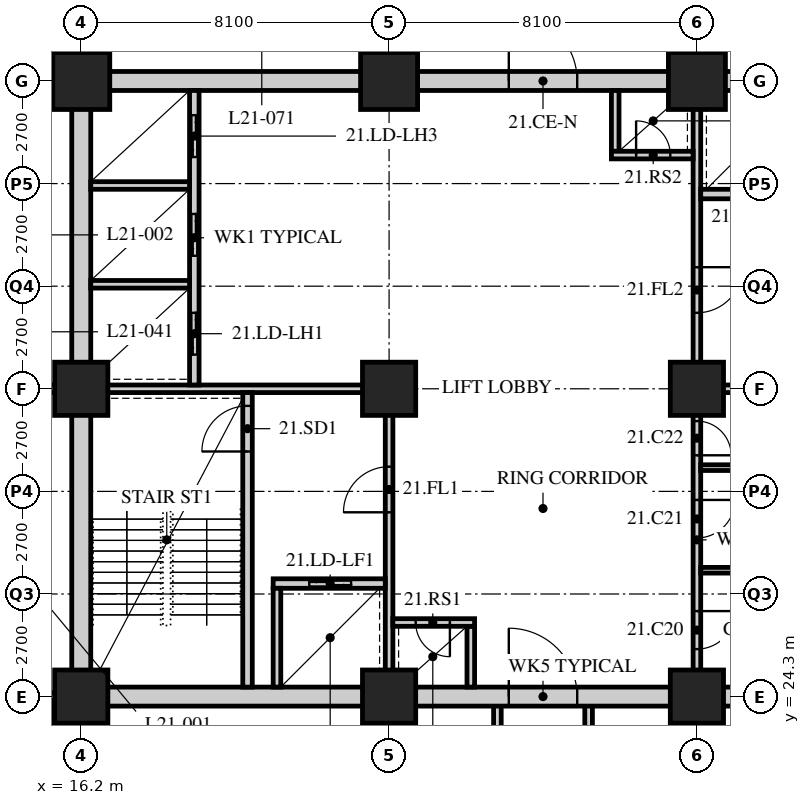
"""IFC4 building model, lengths in metres.
Left out: names, types, materials, properties, quantities, classifications, styles, units other than length and angle.
Written with IfcOpenShell. Run it as: python <this file> out.ifc"""

import sys

from ifc_helpers import new_model, si_unit, direction, frame, frame_2d, origin, origin_2d, place, context, subcontext, project, spatial, rectangle, hollow_rectangle, extrude, element, fill, save


model = new_model("IFC4")
c1 = context("Model", 3, precision=1e-05, world=origin(), true_north=direction((0.0, 1.0)))
c2 = subcontext(c1, "Body", "Model", "MODEL_VIEW")
j1 = project(units=[si_unit("LENGTHUNIT", "METRE"), si_unit("PLANEANGLEUNIT", "RADIAN")], contexts=[c1])
p1 = place(None, origin())
s1 = spatial("IfcSite", under=j1, at=p1, CompositionType="ELEMENT")
p2 = place(p1, origin())
s2 = spatial("IfcBuilding", under=s1, at=p2, CompositionType="ELEMENT")
p3 = place(p2, frame((0.0, 0.0, 84.0)))
s3 = spatial("IfcBuildingStorey", under=s2, at=p3, CompositionType="ELEMENT", Elevation=84.0)
for number, where, z_axis, x_axis in (
    (1, (16.2, 24.3, 0.0), (0.0, 0.0, 1.0), (1.0, 0.0, 0.0)),
    (2, (16.2, 32.4, 0.0), (0.0, 0.0, 1.0), (1.0, 0.0, 0.0)),
):
    element("IfcColumn", number, at=place(p3, frame(where, z_axis=z_axis, x_axis=x_axis)), inside=s3, PredefinedType="COLUMN", context=c2, shape_type="SweptSolid", body=[
        extrude(hollow_rectangle(XDim=1.4, YDim=1.4, WallThickness=0.12, at=origin_2d()), origin(), (0.0, 0.0, 1.0), 3.4),
    ])
p4 = place(p3, frame((16.2, 40.5, 0.0), z_axis=(0.0, 0.0, 1.0), x_axis=(1.0, 0.0, 0.0)))
e3 = element("IfcColumn", 3, at=p4, inside=s3, PredefinedType="COLUMN", context=c2, shape_type="SweptSolid", body=[
    extrude(hollow_rectangle(XDim=1.5, YDim=1.5, WallThickness=0.13, at=origin_2d()), origin(), (0.0, 0.0, 1.0), 3.4),
])
for number, where, z_axis, x_axis in (
    (4, (24.3, 24.3, 0.0), (0.0, 0.0, 1.0), (1.0, 0.0, 0.0)),
    (5, (24.3, 32.4, 0.0), (0.0, 0.0, 1.0), (1.0, 0.0, 0.0)),
):
    element("IfcColumn", number, at=place(p3, frame(where, z_axis=z_axis, x_axis=x_axis)), inside=s3, PredefinedType="COLUMN", context=c2, shape_type="SweptSolid", body=[
        extrude(hollow_rectangle(XDim=1.4, YDim=1.4, WallThickness=0.12, at=origin_2d()), origin(), (0.0, 0.0, 1.0), 3.4),
    ])
p5 = place(p3, frame((24.3, 40.5, 0.0), z_axis=(0.0, 0.0, 1.0), x_axis=(1.0, 0.0, 0.0)))
e6 = element("IfcColumn", 6, at=p5, inside=s3, PredefinedType="COLUMN", context=c2, shape_type="SweptSolid", body=[
    extrude(hollow_rectangle(XDim=1.5, YDim=1.5, WallThickness=0.13, at=origin_2d()), origin(), (0.0, 0.0, 1.0), 3.4),
])
for number, where, z_axis, x_axis in (
    (7, (32.4, 24.3, 0.0), (0.0, 0.0, 1.0), (1.0, 0.0, 0.0)),
    (8, (32.4, 32.4, 0.0), (0.0, 0.0, 1.0), (1.0, 0.0, 0.0)),
):
    element("IfcColumn", number, at=place(p3, frame(where, z_axis=z_axis, x_axis=x_axis)), inside=s3, PredefinedType="COLUMN", context=c2, shape_type="SweptSolid", body=[
        extrude(hollow_rectangle(XDim=1.4, YDim=1.4, WallThickness=0.12, at=origin_2d()), origin(), (0.0, 0.0, 1.0), 3.4),
    ])
p6 = place(p3, frame((32.4, 40.5, 0.0), z_axis=(0.0, 0.0, 1.0), x_axis=(1.0, 0.0, 0.0)))
e9 = element("IfcColumn", 9, at=p6, inside=s3, PredefinedType="COLUMN", context=c2, shape_type="SweptSolid", body=[
    extrude(hollow_rectangle(XDim=1.5, YDim=1.5, WallThickness=0.13, at=origin_2d()), origin(), (0.0, 0.0, 1.0), 3.4),
])
p7 = place(p3, frame((16.0, 40.5, 0.0), z_axis=(0.0, 0.0, 1.0), x_axis=(-1.0, 0.0, 0.0)))
e10 = element("IfcWall", 10, at=p7, inside=s3, PredefinedType="PARTITIONING", context=c2, shape_type="SweptSolid", body=[
    extrude(rectangle(XDim=2.05, YDim=0.15, at=frame_2d((1.025, 0.0))), origin(), (0.0, 0.0, 1.0), 2.428),
])
p8 = place(p3, frame((13.95, 32.4, 0.0), z_axis=(0.0, 0.0, 1.0), x_axis=(1.0, 0.0, 0.0)))
e11 = element("IfcWall", 11, at=p8, inside=s3, PredefinedType="SOLIDWALL", context=c2, shape_type="SweptSolid", body=[
    extrude(rectangle(XDim=2.25, YDim=0.2, at=frame_2d((1.125, 0.0))), origin(), (0.0, 0.0, 1.0), 2.428),
])
p9 = place(p3, frame((15.55, 18.0, 0.0), z_axis=(0.0, 0.0, 1.0), x_axis=(0.0, 1.0, 0.0)))
e12 = element("IfcWall", 12, at=p9, inside=s3, PredefinedType="SOLIDWALL", context=c2, shape_type="SweptSolid", body=[
    extrude(rectangle(XDim=6.3, YDim=0.2, at=frame_2d((3.15, 0.0))), origin(), (0.0, 0.0, 1.0), 3.19),
])
p10 = place(p3, frame((32.407, 18.0, 0.0), z_axis=(0.0, 0.0, 1.0), x_axis=(0.0, 1.0, 0.0)))
e13 = element("IfcWall", 13, at=p10, inside=s3, PredefinedType="SOLIDWALL", context=c2, shape_type="SweptSolid", body=[
    extrude(rectangle(XDim=6.3, YDim=0.2, at=frame_2d((3.15, 0.0))), origin(), (0.0, 0.0, 1.0), 2.428),
])
for number, where, z_axis, x_axis in (
    (14, (27.15, 18.0, 0.0), (0.0, 0.0, 1.0), (0.0, 1.0, 0.0)),
    (15, (29.55, 18.0, 0.0), (0.0, 0.0, 1.0), (0.0, 1.0, 0.0)),
):
    element("IfcWall", number, at=place(p3, frame(where, z_axis=z_axis, x_axis=x_axis)), inside=s3, PredefinedType="SOLIDWALL", context=c2, shape_type="SweptSolid", body=[
        extrude(rectangle(XDim=6.3, YDim=0.2, at=frame_2d((3.15, 0.0))), origin(), (0.0, 0.0, 1.0), 3.19),
    ])
p11 = place(p3, frame((13.95, 24.3, 0.0), z_axis=(0.0, 0.0, 1.0), x_axis=(1.0, 0.0, 0.0)))
e16 = element("IfcWall", 16, at=p11, inside=s3, PredefinedType="SOLIDWALL", context=c2, shape_type="SweptSolid", body=[
    extrude(rectangle(XDim=2.25, YDim=0.2, at=frame_2d((1.125, 0.0))), origin(), (0.0, 0.0, 1.0), 2.428),
])
p12 = place(p3, frame((15.95, 24.3, 0.0), z_axis=(0.0, 0.0, 1.0), x_axis=(1.0, 0.0, 0.0)))
e17 = element("IfcWall", 17, at=p12, inside=s3, PredefinedType="SOLIDWALL", context=c2, shape_type="SweptSolid", body=[
    extrude(rectangle(XDim=24.8, YDim=0.5, at=frame_2d((12.4, 0.0))), origin(), (0.0, 0.0, 1.0), 2.428),
])
p13 = place(p12, frame((11.5, 0.0, 0.0)))
e18 = element("IfcOpeningElement", 18, at=p13, cuts=e17, PredefinedType="OPENING", context=c2, shape_type="SweptSolid", body=[
    extrude(rectangle(XDim=1.8, YDim=2.4, at=frame_2d((0.9, 1.2))), frame((0.0, 0.26, 0.0), z_axis=(0.0, -1.0, 0.0), x_axis=(1.0, 0.0, 0.0)), (0.0, 0.0, 1.0), 0.52),
])
p14 = place(p3, frame((15.95, 40.5, 0.0), z_axis=(0.0, 0.0, 1.0), x_axis=(1.0, 0.0, 0.0)))
e19 = element("IfcWall", 19, at=p14, inside=s3, PredefinedType="SOLIDWALL", context=c2, shape_type="SweptSolid", body=[
    extrude(rectangle(XDim=24.8, YDim=0.5, at=frame_2d((12.4, 0.0))), origin(), (0.0, 0.0, 1.0), 2.428),
])
p15 = place(p14, frame((11.5, 0.0, 0.0)))
e20 = element("IfcOpeningElement", 20, at=p15, cuts=e19, PredefinedType="OPENING", context=c2, shape_type="SweptSolid", body=[
    extrude(rectangle(XDim=1.8, YDim=2.4, at=frame_2d((0.9, 1.2))), frame((0.0, 0.26, 0.0), z_axis=(0.0, -1.0, 0.0), x_axis=(1.0, 0.0, 0.0)), (0.0, 0.0, 1.0), 0.52),
])
p16 = place(p3, frame((16.2, 24.55, 0.0), z_axis=(0.0, 0.0, 1.0), x_axis=(0.0, 1.0, 0.0)))
e21 = element("IfcWall", 21, at=p16, inside=s3, PredefinedType="SOLIDWALL", context=c2, shape_type="SweptSolid", body=[
    extrude(rectangle(XDim=15.7, YDim=0.5, at=frame_2d((7.85, 0.0))), origin(), (0.0, 0.0, 1.0), 2.428),
])
p17 = place(p3, frame((16.45, 32.4, 0.0), z_axis=(0.0, 0.0, 1.0), x_axis=(1.0, 0.0, 0.0)))
e22 = element("IfcWall", 22, at=p17, inside=s3, PredefinedType="SOLIDWALL", context=c2, shape_type="SweptSolid", body=[
    extrude(rectangle(XDim=7.95, YDim=0.2, at=frame_2d((3.975, 0.0))), origin(), (0.0, 0.0, 1.0), 2.578),
])
p18 = place(p3, frame((24.3, 24.55, 0.0), z_axis=(0.0, 0.0, 1.0), x_axis=(0.0, 1.0, 0.0)))
e23 = element("IfcWall", 23, at=p18, inside=s3, PredefinedType="SOLIDWALL", context=c2, shape_type="SweptSolid", body=[
    extrude(rectangle(XDim=7.75, YDim=0.2, at=frame_2d((3.875, 0.0))), origin(), (0.0, 0.0, 1.0), 2.578),
])
p19 = place(p18, frame((4.6, 0.0, 0.0)))
e24 = element("IfcOpeningElement", 24, at=p19, cuts=e23, PredefinedType="OPENING", context=c2, shape_type="SweptSolid", body=[
    extrude(rectangle(XDim=1.2, YDim=2.1, at=frame_2d((0.6, 1.05))), frame((0.0, 0.11, 0.0), z_axis=(0.0, -1.0, 0.0), x_axis=(1.0, 0.0, 0.0)), (0.0, 0.0, 1.0), 0.22),
])
p20 = place(p3, frame((20.575, 24.55, 0.0), z_axis=(0.0, 0.0, 1.0), x_axis=(0.0, 1.0, 0.0)))
e25 = element("IfcWall", 25, at=p20, inside=s3, PredefinedType="SOLIDWALL", context=c2, shape_type="SweptSolid", body=[
    extrude(rectangle(XDim=7.75, YDim=0.25, at=frame_2d((3.875, 0.0))), origin(), (0.0, 0.0, 1.0), 3.19),
])
p21 = place(p20, frame((6.2, 0.0, 0.0)))
e26 = element("IfcOpeningElement", 26, at=p21, cuts=e25, PredefinedType="OPENING", context=c2, shape_type="SweptSolid", body=[
    extrude(rectangle(XDim=1.2, YDim=2.1, at=frame_2d((0.6, 1.05))), frame((0.0, 0.135, 0.0), z_axis=(0.0, -1.0, 0.0), x_axis=(1.0, 0.0, 0.0)), (0.0, 0.0, 1.0), 0.27),
])
p22 = place(p3, frame((21.25, 27.275, 0.0), z_axis=(0.0, 0.0, 1.0), x_axis=(1.0, 0.0, 0.0)))
e27 = element("IfcWall", 27, at=p22, inside=s3, PredefinedType="SOLIDWALL", context=c2, shape_type="SweptSolid", body=[
    extrude(rectangle(XDim=2.95, YDim=0.25, at=frame_2d((1.475, 0.0))), origin(), (0.0, 0.0, 1.0), 3.19),
])
p23 = place(p22, frame((0.95, 0.0, 0.0)))
e28 = element("IfcOpeningElement", 28, at=p23, cuts=e27, PredefinedType="OPENING", context=c2, shape_type="SweptSolid", body=[
    extrude(rectangle(XDim=1.1, YDim=2.4, at=frame_2d((0.55, 1.2))), frame((0.0, 0.135, 0.0), z_axis=(0.0, -1.0, 0.0), x_axis=(1.0, 0.0, 0.0)), (0.0, 0.0, 1.0), 0.27),
])
p24 = place(p3, frame((21.35, 24.55, 0.0), z_axis=(0.0, 0.0, 1.0), x_axis=(0.0, 1.0, 0.0)))
e29 = element("IfcWall", 29, at=p24, inside=s3, PredefinedType="SOLIDWALL", context=c2, shape_type="SweptSolid", body=[
    extrude(rectangle(XDim=2.6, YDim=0.2, at=frame_2d((1.3, 0.0))), origin(), (0.0, 0.0, 1.0), 3.19),
])
p25 = place(p3, frame((19.175, 32.5, 0.0), z_axis=(0.0, 0.0, 1.0), x_axis=(0.0, 1.0, 0.0)))
e30 = element("IfcWall", 30, at=p25, inside=s3, PredefinedType="SOLIDWALL", context=c2, shape_type="SweptSolid", body=[
    extrude(rectangle(XDim=7.75, YDim=0.25, at=frame_2d((3.875, 0.0))), origin(), (0.0, 0.0, 1.0), 3.19),
])
p26 = place(p25, frame((0.8, 0.0, 0.0)))
e31 = element("IfcOpeningElement", 31, at=p26, cuts=e30, PredefinedType="OPENING", context=c2, shape_type="SweptSolid", body=[
    extrude(rectangle(XDim=1.1, YDim=2.4, at=frame_2d((0.55, 1.2))), frame((0.0, 0.135, 0.0), z_axis=(0.0, -1.0, 0.0), x_axis=(1.0, 0.0, 0.0)), (0.0, 0.0, 1.0), 0.27),
])
p27 = place(p25, frame((3.4, 0.0, 0.0)))
e32 = element("IfcOpeningElement", 32, at=p27, cuts=e30, PredefinedType="OPENING", context=c2, shape_type="SweptSolid", body=[
    extrude(rectangle(XDim=1.1, YDim=2.4, at=frame_2d((0.55, 1.2))), frame((0.0, 0.135, 0.0), z_axis=(0.0, -1.0, 0.0), x_axis=(1.0, 0.0, 0.0)), (0.0, 0.0, 1.0), 0.27),
])
p28 = place(p25, frame((6.0, 0.0, 0.0)))
e33 = element("IfcOpeningElement", 33, at=p28, cuts=e30, PredefinedType="OPENING", context=c2, shape_type="SweptSolid", body=[
    extrude(rectangle(XDim=1.1, YDim=2.4, at=frame_2d((0.55, 1.2))), frame((0.0, 0.135, 0.0), z_axis=(0.0, -1.0, 0.0), x_axis=(1.0, 0.0, 0.0)), (0.0, 0.0, 1.0), 0.27),
])
for number, where, z_axis, x_axis in (
    (34, (16.45, 35.15, 0.0), (0.0, 0.0, 1.0), (1.0, 0.0, 0.0)),
    (35, (16.45, 37.75, 0.0), (0.0, 0.0, 1.0), (1.0, 0.0, 0.0)),
):
    element("IfcWall", number, at=place(p3, frame(where, z_axis=z_axis, x_axis=x_axis)), inside=s3, PredefinedType="SOLIDWALL", context=c2, shape_type="SweptSolid", body=[
        extrude(rectangle(XDim=2.6, YDim=0.2, at=frame_2d((1.3, 0.0))), origin(), (0.0, 0.0, 1.0), 3.19),
    ])
p29 = place(p3, frame((26.45, 24.55, 0.0), z_axis=(0.0, 0.0, 1.0), x_axis=(0.0, 1.0, 0.0)))
e36 = element("IfcWall", 36, at=p29, inside=s3, PredefinedType="SOLIDWALL", context=c2, shape_type="SweptSolid", body=[
    extrude(rectangle(XDim=1.6, YDim=0.2, at=frame_2d((0.8, 0.0))), origin(), (0.0, 0.0, 1.0), 3.19),
])
p30 = place(p3, frame((24.4, 26.25, 0.0), z_axis=(0.0, 0.0, 1.0), x_axis=(1.0, 0.0, 0.0)))
e37 = element("IfcWall", 37, at=p30, inside=s3, PredefinedType="SOLIDWALL", context=c2, shape_type="SweptSolid", body=[
    extrude(rectangle(XDim=2.15, YDim=0.2, at=frame_2d((1.075, 0.0))), origin(), (0.0, 0.0, 1.0), 3.19),
])
p31 = place(p30, frame((0.6, 0.0, 0.0)))
e38 = element("IfcOpeningElement", 38, at=p31, cuts=e37, PredefinedType="OPENING", context=c2, shape_type="SweptSolid", body=[
    extrude(rectangle(XDim=0.9, YDim=2.1, at=frame_2d((0.45, 1.05))), frame((0.0, 0.11, 0.0), z_axis=(0.0, -1.0, 0.0), x_axis=(1.0, 0.0, 0.0)), (0.0, 0.0, 1.0), 0.22),
])
p32 = place(p3, frame((32.3, 32.4, 0.0), z_axis=(0.0, 0.0, 1.0), x_axis=(1.0, 0.0, 0.0)))
e39 = element("IfcWall", 39, at=p32, inside=s3, PredefinedType="SOLIDWALL", context=c2, shape_type="SweptSolid", body=[
    extrude(rectangle(XDim=7.95, YDim=0.2, at=frame_2d((3.975, 0.0))), origin(), (0.0, 0.0, 1.0), 2.578),
])
p33 = place(p3, frame((32.4, 32.5, 0.0), z_axis=(0.0, 0.0, 1.0), x_axis=(0.0, 1.0, 0.0)))
e40 = element("IfcWall", 40, at=p33, inside=s3, PredefinedType="SOLIDWALL", context=c2, shape_type="SweptSolid", body=[
    extrude(rectangle(XDim=7.75, YDim=0.2, at=frame_2d((3.875, 0.0))), origin(), (0.0, 0.0, 1.0), 2.578),
])
p34 = place(p33, frame((1.9, 0.0, 0.0)))
e41 = element("IfcOpeningElement", 41, at=p34, cuts=e40, PredefinedType="OPENING", context=c2, shape_type="SweptSolid", body=[
    extrude(rectangle(XDim=1.2, YDim=2.1, at=frame_2d((0.6, 1.05))), frame((0.0, 0.11, 0.0), z_axis=(0.0, -1.0, 0.0), x_axis=(1.0, 0.0, 0.0)), (0.0, 0.0, 1.0), 0.22),
])
p35 = place(p3, frame((32.5, 37.525, 0.0), z_axis=(0.0, 0.0, 1.0), x_axis=(1.0, 0.0, 0.0)))
e42 = element("IfcWall", 42, at=p35, inside=s3, PredefinedType="SOLIDWALL", context=c2, shape_type="SweptSolid", body=[
    extrude(rectangle(XDim=2.95, YDim=0.25, at=frame_2d((1.475, 0.0))), origin(), (0.0, 0.0, 1.0), 3.19),
])
p36 = place(p35, frame((0.9, 0.0, 0.0)))
e43 = element("IfcOpeningElement", 43, at=p36, cuts=e42, PredefinedType="OPENING", context=c2, shape_type="SweptSolid", body=[
    extrude(rectangle(XDim=1.1, YDim=2.4, at=frame_2d((0.55, 1.2))), frame((0.0, 0.135, 0.0), z_axis=(0.0, -1.0, 0.0), x_axis=(1.0, 0.0, 0.0)), (0.0, 0.0, 1.0), 0.27),
])
p37 = place(p3, frame((30.25, 38.65, 0.0), z_axis=(0.0, 0.0, 1.0), x_axis=(0.0, 1.0, 0.0)))
e44 = element("IfcWall", 44, at=p37, inside=s3, PredefinedType="SOLIDWALL", context=c2, shape_type="SweptSolid", body=[
    extrude(rectangle(XDim=1.6, YDim=0.2, at=frame_2d((0.8, 0.0))), origin(), (0.0, 0.0, 1.0), 3.19),
])
p38 = place(p3, frame((30.15, 38.55, 0.0), z_axis=(0.0, 0.0, 1.0), x_axis=(1.0, 0.0, 0.0)))
e45 = element("IfcWall", 45, at=p38, inside=s3, PredefinedType="SOLIDWALL", context=c2, shape_type="SweptSolid", body=[
    extrude(rectangle(XDim=2.15, YDim=0.2, at=frame_2d((1.075, 0.0))), origin(), (0.0, 0.0, 1.0), 3.19),
])
p39 = place(p38, frame((0.65, 0.0, 0.0)))
e46 = element("IfcOpeningElement", 46, at=p39, cuts=e45, PredefinedType="OPENING", context=c2, shape_type="SweptSolid", body=[
    extrude(rectangle(XDim=0.9, YDim=2.1, at=frame_2d((0.45, 1.05))), frame((0.0, 0.11, 0.0), z_axis=(0.0, -1.0, 0.0), x_axis=(1.0, 0.0, 0.0)), (0.0, 0.0, 1.0), 0.22),
])
p40 = place(p3, frame((32.4, 24.55, 0.0), z_axis=(0.0, 0.0, 1.0), x_axis=(0.0, 1.0, 0.0)))
e47 = element("IfcWall", 47, at=p40, inside=s3, PredefinedType="PARTITIONING", context=c2, shape_type="SweptSolid", body=[
    extrude(rectangle(XDim=7.75, YDim=0.2, at=frame_2d((3.875, 0.0))), origin(), (0.0, 0.0, 1.0), 2.578),
])
p41 = place(p40, frame((1.0, 0.0, 0.0)))
e48 = element("IfcOpeningElement", 48, at=p41, cuts=e47, PredefinedType="OPENING", context=c2, shape_type="SweptSolid", body=[
    extrude(rectangle(XDim=1.0, YDim=2.1, at=frame_2d((0.5, 1.05))), frame((0.0, 0.11, 0.0), z_axis=(0.0, -1.0, 0.0), x_axis=(1.0, 0.0, 0.0)), (0.0, 0.0, 1.0), 0.22),
])
p42 = place(p40, frame((3.925, 0.0, 0.0)))
e49 = element("IfcOpeningElement", 49, at=p42, cuts=e47, PredefinedType="OPENING", context=c2, shape_type="SweptSolid", body=[
    extrude(rectangle(XDim=1.0, YDim=2.1, at=frame_2d((0.5, 1.05))), frame((0.0, 0.11, 0.0), z_axis=(0.0, -1.0, 0.0), x_axis=(1.0, 0.0, 0.0)), (0.0, 0.0, 1.0), 0.22),
])
p43 = place(p40, frame((6.1, 0.0, 0.0)))
e50 = element("IfcOpeningElement", 50, at=p43, cuts=e47, PredefinedType="OPENING", context=c2, shape_type="SweptSolid", body=[
    extrude(rectangle(XDim=0.9, YDim=2.1, at=frame_2d((0.45, 1.05))), frame((0.0, 0.11, 0.0), z_axis=(0.0, -1.0, 0.0), x_axis=(1.0, 0.0, 0.0)), (0.0, 0.0, 1.0), 0.22),
])
for number, where, z_axis, x_axis in (
    (51, (32.5, 27.625, 0.0), (0.0, 0.0, 1.0), (1.0, 0.0, 0.0)),
    (52, (32.5, 30.325, 0.0), (0.0, 0.0, 1.0), (1.0, 0.0, 0.0)),
):
    element("IfcWall", number, at=place(p3, frame(where, z_axis=z_axis, x_axis=x_axis)), inside=s3, PredefinedType="PARTITIONING", context=c2, shape_type="SweptSolid", body=[
        extrude(rectangle(XDim=4.9, YDim=0.15, at=frame_2d((2.45, 0.0))), origin(), (0.0, 0.0, 1.0), 3.19),
    ])
p44 = place(p41, origin())
e53 = element("IfcDoor", 53, at=p44, inside=s3, OperationType="SINGLE_SWING_LEFT", PredefinedType="DOOR", context=c2, shape_type="SweptSolid", body=[
    extrude(rectangle(XDim=1.0, YDim=2.1, at=frame_2d((0.5, 1.05))), frame((0.0, 0.025, 0.0), z_axis=(0.0, -1.0, 0.0), x_axis=(1.0, 0.0, 0.0)), (0.0, 0.0, 1.0), 0.05),
])
fill(e48, e53)
p45 = place(p42, origin())
e54 = element("IfcDoor", 54, at=p45, inside=s3, OperationType="SINGLE_SWING_LEFT", PredefinedType="DOOR", context=c2, shape_type="SweptSolid", body=[
    extrude(rectangle(XDim=1.0, YDim=2.1, at=frame_2d((0.5, 1.05))), frame((0.0, 0.025, 0.0), z_axis=(0.0, -1.0, 0.0), x_axis=(1.0, 0.0, 0.0)), (0.0, 0.0, 1.0), 0.05),
])
fill(e49, e54)
p46 = place(p43, origin())
e55 = element("IfcDoor", 55, at=p46, inside=s3, OperationType="SINGLE_SWING_RIGHT", PredefinedType="DOOR", context=c2, shape_type="SweptSolid", body=[
    extrude(rectangle(XDim=0.9, YDim=2.1, at=frame_2d((0.45, 1.05))), frame((0.0, 0.025, 0.0), z_axis=(0.0, -1.0, 0.0), x_axis=(1.0, 0.0, 0.0)), (0.0, 0.0, 1.0), 0.05),
])
fill(e50, e55)
p47 = place(p21, origin())
e56 = element("IfcDoor", 56, at=p47, inside=s3, OperationType="SINGLE_SWING_LEFT", PredefinedType="DOOR", context=c2, shape_type="SweptSolid", body=[
    extrude(rectangle(XDim=1.2, YDim=2.1, at=frame_2d((0.6, 1.05))), frame((0.0, 0.025, 0.0), z_axis=(0.0, -1.0, 0.0), x_axis=(1.0, 0.0, 0.0)), (0.0, 0.0, 1.0), 0.05),
])
fill(e26, e56)
p48 = place(p19, origin())
e57 = element("IfcDoor", 57, at=p48, inside=s3, OperationType="SINGLE_SWING_LEFT", PredefinedType="DOOR", context=c2, shape_type="SweptSolid", body=[
    extrude(rectangle(XDim=1.2, YDim=2.1, at=frame_2d((0.6, 1.05))), frame((0.0, 0.025, 0.0), z_axis=(0.0, -1.0, 0.0), x_axis=(1.0, 0.0, 0.0)), (0.0, 0.0, 1.0), 0.05),
])
fill(e24, e57)
p49 = place(p31, origin())
e58 = element("IfcDoor", 58, at=p49, inside=s3, OperationType="SINGLE_SWING_LEFT", PredefinedType="DOOR", context=c2, shape_type="SweptSolid", body=[
    extrude(rectangle(XDim=0.9, YDim=2.1, at=frame_2d((0.45, 1.05))), frame((0.0, 0.025, 0.0), z_axis=(0.0, -1.0, 0.0), x_axis=(1.0, 0.0, 0.0)), (0.0, 0.0, 1.0), 0.05),
])
fill(e38, e58)
p50 = place(p34, origin())
e59 = element("IfcDoor", 59, at=p50, inside=s3, OperationType="SINGLE_SWING_LEFT", PredefinedType="DOOR", context=c2, shape_type="SweptSolid", body=[
    extrude(rectangle(XDim=1.2, YDim=2.1, at=frame_2d((0.6, 1.05))), frame((0.0, 0.025, 0.0), z_axis=(0.0, -1.0, 0.0), x_axis=(1.0, 0.0, 0.0)), (0.0, 0.0, 1.0), 0.05),
])
fill(e41, e59)
p51 = place(p39, origin())
e60 = element("IfcDoor", 60, at=p51, inside=s3, OperationType="SINGLE_SWING_LEFT", PredefinedType="DOOR", context=c2, shape_type="SweptSolid", body=[
    extrude(rectangle(XDim=0.9, YDim=2.1, at=frame_2d((0.45, 1.05))), frame((0.0, 0.025, 0.0), z_axis=(0.0, -1.0, 0.0), x_axis=(1.0, 0.0, 0.0)), (0.0, 0.0, 1.0), 0.05),
])
fill(e46, e60)
p52 = place(p26, origin())
e61 = element("IfcDoor", 61, at=p52, inside=s3, OperationType="DOUBLE_DOOR_SLIDING", PredefinedType="DOOR", context=c2, shape_type="SweptSolid", body=[
    extrude(rectangle(XDim=1.1, YDim=2.4, at=frame_2d((0.55, 1.2))), frame((0.0, 0.025, 0.0), z_axis=(0.0, -1.0, 0.0), x_axis=(1.0, 0.0, 0.0)), (0.0, 0.0, 1.0), 0.05),
])
fill(e31, e61)
p53 = place(p27, origin())
e62 = element("IfcDoor", 62, at=p53, inside=s3, OperationType="DOUBLE_DOOR_SLIDING", PredefinedType="DOOR", context=c2, shape_type="SweptSolid", body=[
    extrude(rectangle(XDim=1.1, YDim=2.4, at=frame_2d((0.55, 1.2))), frame((0.0, 0.025, 0.0), z_axis=(0.0, -1.0, 0.0), x_axis=(1.0, 0.0, 0.0)), (0.0, 0.0, 1.0), 0.05),
])
fill(e32, e62)
p54 = place(p28, origin())
e63 = element("IfcDoor", 63, at=p54, inside=s3, OperationType="DOUBLE_DOOR_SLIDING", PredefinedType="DOOR", context=c2, shape_type="SweptSolid", body=[
    extrude(rectangle(XDim=1.1, YDim=2.4, at=frame_2d((0.55, 1.2))), frame((0.0, 0.025, 0.0), z_axis=(0.0, -1.0, 0.0), x_axis=(1.0, 0.0, 0.0)), (0.0, 0.0, 1.0), 0.05),
])
fill(e33, e63)
p55 = place(p23, origin())
e64 = element("IfcDoor", 64, at=p55, inside=s3, OperationType="DOUBLE_DOOR_SLIDING", PredefinedType="DOOR", context=c2, shape_type="SweptSolid", body=[
    extrude(rectangle(XDim=1.1, YDim=2.4, at=frame_2d((0.55, 1.2))), frame((0.0, 0.025, 0.0), z_axis=(0.0, -1.0, 0.0), x_axis=(1.0, 0.0, 0.0)), (0.0, 0.0, 1.0), 0.05),
])
fill(e28, e64)
p56 = place(p13, origin())
e65 = element("IfcDoor", 65, at=p56, inside=s3, OperationType="DOUBLE_DOOR_SINGLE_SWING", PredefinedType="DOOR", context=c2, shape_type="SweptSolid", body=[
    extrude(rectangle(XDim=1.8, YDim=2.4, at=frame_2d((0.9, 1.2))), frame((0.0, 0.025, 0.0), z_axis=(0.0, -1.0, 0.0), x_axis=(1.0, 0.0, 0.0)), (0.0, 0.0, 1.0), 0.05),
])
fill(e18, e65)
p57 = place(p15, origin())
e66 = element("IfcDoor", 66, at=p57, inside=s3, OperationType="DOUBLE_DOOR_SINGLE_SWING", PredefinedType="DOOR", context=c2, shape_type="SweptSolid", body=[
    extrude(rectangle(XDim=1.8, YDim=2.4, at=frame_2d((0.9, 1.2))), frame((0.0, 0.025, 0.0), z_axis=(0.0, -1.0, 0.0), x_axis=(1.0, 0.0, 0.0)), (0.0, 0.0, 1.0), 0.05),
])
fill(e20, e66)
save(model, sys.argv[1])
